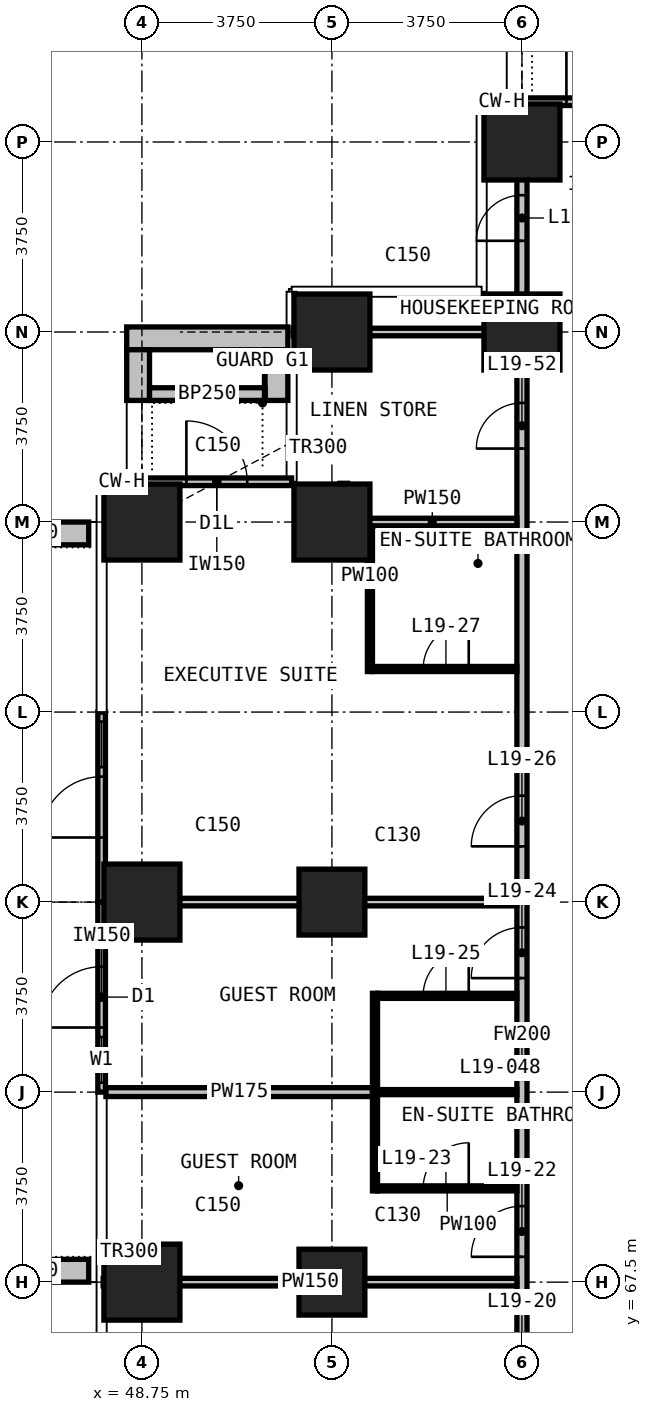
"""IFC4 building model, lengths in metres.
Left out: names, types, materials, properties, quantities, classifications, styles, units other than length and angle.
Written with IfcOpenShell. Run it as: python <this file> out.ifc"""

import sys

from ifc_helpers import new_model, si_unit, direction, frame, frame_2d, origin, origin_2d, place, context, subcontext, project, spatial, rectangle, extrude, element, fill, save


model = new_model("IFC4")
c1 = context("Model", 3, precision=1e-05, world=origin(), true_north=direction((0.0, 1.0)))
c2 = subcontext(c1, "Body", "Model", "MODEL_VIEW")
j1 = project(units=[si_unit("LENGTHUNIT", "METRE"), si_unit("PLANEANGLEUNIT", "RADIAN")], contexts=[c1])
p1 = place(None, origin())
s1 = spatial("IfcSite", under=j1, at=p1, CompositionType="ELEMENT")
p2 = place(p1, origin())
s2 = spatial("IfcBuilding", under=s1, at=p2, CompositionType="ELEMENT")
p3 = place(p2, frame((0.0, 0.0, 82.4)))
s3 = spatial("IfcBuildingStorey", under=s2, at=p3, CompositionType="ELEMENT", Elevation=82.4)
for number, where, z_axis, x_axis in (
    (1, (48.75, 67.5, 0.0), (0.0, 0.0, 1.0), (1.0, 0.0, 0.0)),
    (2, (48.75, 75.0, 0.0), (0.0, 0.0, 1.0), (1.0, 0.0, 0.0)),
    (3, (48.75, 82.5, 0.0), (0.0, 0.0, 1.0), (1.0, 0.0, 0.0)),
):
    element("IfcColumn", number, at=place(p3, frame(where, z_axis=z_axis, x_axis=x_axis)), inside=s3, PredefinedType="COLUMN", context=c2, shape_type="SweptSolid", body=[
        extrude(rectangle(XDim=1.5, YDim=1.5, at=origin_2d()), origin(), (0.0, 0.0, 1.0), 3.3),
    ])
for number, where, z_axis, x_axis in (
    (4, (52.5, 67.5, 0.0), (0.0, 0.0, 1.0), (1.0, 0.0, 0.0)),
    (5, (52.5, 75.0, 0.0), (0.0, 0.0, 1.0), (1.0, 0.0, 0.0)),
):
    element("IfcColumn", number, at=place(p3, frame(where, z_axis=z_axis, x_axis=x_axis)), inside=s3, PredefinedType="COLUMN", context=c2, shape_type="SweptSolid", body=[
        extrude(rectangle(XDim=1.3, YDim=1.3, at=origin_2d()), origin(), (0.0, 0.0, 1.0), 3.3),
    ])
for number, where, z_axis, x_axis in (
    (6, (52.5, 82.5, 0.0), (0.0, 0.0, 1.0), (1.0, 0.0, 0.0)),
    (7, (52.5, 86.25, 0.0), (0.0, 0.0, 1.0), (1.0, 0.0, 0.0)),
    (8, (56.25, 86.25, 0.0), (0.0, 0.0, 1.0), (1.0, 0.0, 0.0)),
    (9, (56.25, 90.0, 0.0), (0.0, 0.0, 1.0), (1.0, 0.0, 0.0)),
):
    element("IfcColumn", number, at=place(p3, frame(where, z_axis=z_axis, x_axis=x_axis)), inside=s3, PredefinedType="COLUMN", context=c2, shape_type="SweptSolid", body=[
        extrude(rectangle(XDim=1.5, YDim=1.5, at=origin_2d()), origin(), (0.0, 0.0, 1.0), 3.3),
    ])
p4 = place(p3, frame((56.25, 90.795, 0.0), z_axis=(0.0, 0.0, 1.0), x_axis=(1.0, 0.0, 0.0)))
e10 = element("IfcWall", 10, at=p4, inside=s3, PredefinedType="SOLIDWALL", context=c2, shape_type="SweptSolid", body=[
    extrude(rectangle(XDim=2.955, YDim=0.15, at=frame_2d((1.478, 0.0))), origin(), (0.0, 0.0, 1.0), 3.0),
])
p5 = place(p4, frame((0.877, 0.0, 0.0)))
e11 = element("IfcOpeningElement", 11, at=p5, cuts=e10, PredefinedType="OPENING", context=c2, shape_type="SweptSolid", body=[
    extrude(rectangle(XDim=1.2, YDim=2.4, at=frame_2d((0.6, 1.2))), frame((0.0, 0.085, 0.0), z_axis=(0.0, -1.0, 0.0), x_axis=(1.0, 0.0, 0.0)), (0.0, 0.0, 1.0), 0.17),
])
p6 = place(p3, frame((48.75, 83.295, 0.0), z_axis=(0.0, 0.0, 1.0), x_axis=(1.0, 0.0, 0.0)))
e12 = element("IfcWall", 12, at=p6, inside=s3, PredefinedType="SOLIDWALL", context=c2, shape_type="SweptSolid", body=[
    extrude(rectangle(XDim=2.955, YDim=0.15, at=frame_2d((1.478, 0.0))), origin(), (0.0, 0.0, 1.0), 3.0),
])
p7 = place(p6, frame((0.877, 0.0, 0.0)))
e13 = element("IfcOpeningElement", 13, at=p7, cuts=e12, PredefinedType="OPENING", context=c2, shape_type="SweptSolid", body=[
    extrude(rectangle(XDim=1.2, YDim=2.0, at=frame_2d((0.6, 1.0))), frame((0.0, 0.085, 0.0), z_axis=(0.0, -1.0, 0.0), x_axis=(1.0, 0.0, 0.0)), (0.0, 0.0, 1.0), 0.17),
])
p8 = place(p3, frame((47.955, 71.25, 0.0), z_axis=(0.0, 0.0, 1.0), x_axis=(0.0, 1.0, 0.0)))
e14 = element("IfcWall", 14, at=p8, inside=s3, PredefinedType="SOLIDWALL", context=c2, shape_type="SweptSolid", body=[
    extrude(rectangle(XDim=3.75, YDim=0.15, at=frame_2d((1.875, 0.0))), origin(), (0.0, 0.0, 1.0), 3.0),
])
p9 = place(p8, frame((0.188, 0.0, 0.1)))
e15 = element("IfcOpeningElement", 15, at=p9, cuts=e14, PredefinedType="OPENING", context=c2, shape_type="SweptSolid", body=[
    extrude(rectangle(XDim=0.9, YDim=2.4, at=frame_2d((0.45, 1.2))), frame((0.0, 0.085, 0.0), z_axis=(0.0, -1.0, 0.0), x_axis=(1.0, 0.0, 0.0)), (0.0, 0.0, 1.0), 0.17),
])
p10 = place(p8, frame((1.275, 0.0, 0.0)))
e16 = element("IfcOpeningElement", 16, at=p10, cuts=e14, PredefinedType="OPENING", context=c2, shape_type="SweptSolid", body=[
    extrude(rectangle(XDim=1.2, YDim=2.4, at=frame_2d((0.6, 1.2))), frame((0.0, 0.085, 0.0), z_axis=(0.0, -1.0, 0.0), x_axis=(1.0, 0.0, 0.0)), (0.0, 0.0, 1.0), 0.17),
])
p11 = place(p3, frame((47.955, 75.0, 0.0), z_axis=(0.0, 0.0, 1.0), x_axis=(0.0, 1.0, 0.0)))
e17 = element("IfcWall", 17, at=p11, inside=s3, PredefinedType="SOLIDWALL", context=c2, shape_type="SweptSolid", body=[
    extrude(rectangle(XDim=3.75, YDim=0.15, at=frame_2d((1.875, 0.0))), origin(), (0.0, 0.0, 1.0), 3.0),
])
p12 = place(p11, frame((1.275, 0.0, 0.0)))
e18 = element("IfcOpeningElement", 18, at=p12, cuts=e17, PredefinedType="OPENING", context=c2, shape_type="SweptSolid", body=[
    extrude(rectangle(XDim=1.2, YDim=2.4, at=frame_2d((0.6, 1.2))), frame((0.0, 0.085, 0.0), z_axis=(0.0, -1.0, 0.0), x_axis=(1.0, 0.0, 0.0)), (0.0, 0.0, 1.0), 0.17),
])
p13 = place(p11, frame((2.663, 0.0, 0.1)))
e19 = element("IfcOpeningElement", 19, at=p13, cuts=e17, PredefinedType="OPENING", context=c2, shape_type="SweptSolid", body=[
    extrude(rectangle(XDim=0.9, YDim=2.4, at=frame_2d((0.45, 1.2))), frame((0.0, 0.085, 0.0), z_axis=(0.0, -1.0, 0.0), x_axis=(1.0, 0.0, 0.0)), (0.0, 0.0, 1.0), 0.17),
])
p14 = place(p3, frame((48.45, 86.125, 0.0), z_axis=(0.0, 0.0, 1.0), x_axis=(1.0, 0.0, 0.0)))
e20 = element("IfcWall", 20, at=p14, inside=s3, PredefinedType="USERDEFINED", context=c2, shape_type="SweptSolid", body=[
    extrude(rectangle(XDim=3.18, YDim=0.45, at=frame_2d((1.59, 0.0))), origin(), (0.0, 0.0, 1.0), 1.1),
])
for number, where, z_axis, x_axis in (
    (21, (48.675, 84.9, 0.0), (0.0, 0.0, 1.0), (0.0, 1.0, 0.0)),
    (22, (51.405, 84.9, 0.0), (0.0, 0.0, 1.0), (0.0, 1.0, 0.0)),
):
    element("IfcWall", number, at=place(p3, frame(where, z_axis=z_axis, x_axis=x_axis)), inside=s3, PredefinedType="USERDEFINED", context=c2, shape_type="SweptSolid", body=[
        extrude(rectangle(XDim=1.0, YDim=0.45, at=frame_2d((0.5, 0.0))), origin(), (0.0, 0.0, 1.0), 1.1),
    ])
p15 = place(p3, frame((48.9, 85.025, 0.0), z_axis=(0.0, 0.0, 1.0), x_axis=(1.0, 0.0, 0.0)))
e23 = element("IfcWall", 23, at=p15, inside=s3, PredefinedType="USERDEFINED", context=c2, shape_type="SweptSolid", body=[
    extrude(rectangle(XDim=2.28, YDim=0.25, at=frame_2d((1.14, 0.0))), origin(), (0.0, 0.0, 1.0), 1.0),
])
for number, where, z_axis, x_axis in (
    (24, (47.7, 67.725, 0.0), (0.0, 0.0, 1.0), (-1.0, 0.0, 0.0)),
    (25, (47.7, 82.275, 0.0), (0.0, 0.0, 1.0), (-1.0, 0.0, 0.0)),
):
    element("IfcWall", number, at=place(p3, frame(where, z_axis=z_axis, x_axis=x_axis)), inside=s3, PredefinedType="USERDEFINED", context=c2, shape_type="SweptSolid", body=[
        extrude(rectangle(XDim=2.35, YDim=0.45, at=frame_2d((1.175, 0.0))), origin(), (0.0, 0.0, 1.0), 1.1),
    ])
p16 = place(p3, frame((56.25, 52.4, 0.0), z_axis=(0.0, 0.0, 1.0), x_axis=(0.0, 1.0, 0.0)))
e26 = element("IfcWall", 26, at=p16, inside=s3, PredefinedType="PARTITIONING", context=c2, shape_type="SweptSolid", body=[
    extrude(rectangle(XDim=38.31, YDim=0.2, at=frame_2d((19.155, 0.0))), origin(), (0.0, 0.0, 1.0), 3.0),
])
p17 = place(p16, frame((2.35, 0.0, 0.0)))
e27 = element("IfcOpeningElement", 27, at=p17, cuts=e26, PredefinedType="OPENING", context=c2, shape_type="SweptSolid", body=[
    extrude(rectangle(XDim=1.0, YDim=2.2, at=frame_2d((0.5, 1.1))), frame((0.0, 0.11, 0.0), z_axis=(0.0, -1.0, 0.0), x_axis=(1.0, 0.0, 0.0)), (0.0, 0.0, 1.0), 0.22),
])
p18 = place(p16, frame((4.35, 0.0, 0.0)))
e28 = element("IfcOpeningElement", 28, at=p18, cuts=e26, PredefinedType="OPENING", context=c2, shape_type="SweptSolid", body=[
    extrude(rectangle(XDim=1.0, YDim=2.2, at=frame_2d((0.5, 1.1))), frame((0.0, 0.11, 0.0), z_axis=(0.0, -1.0, 0.0), x_axis=(1.0, 0.0, 0.0)), (0.0, 0.0, 1.0), 0.22),
])
p19 = place(p16, frame((13.0, 0.0, 0.0)))
e29 = element("IfcOpeningElement", 29, at=p19, cuts=e26, PredefinedType="OPENING", context=c2, shape_type="SweptSolid", body=[
    extrude(rectangle(XDim=1.0, YDim=2.2, at=frame_2d((0.5, 1.1))), frame((0.0, 0.11, 0.0), z_axis=(0.0, -1.0, 0.0), x_axis=(1.0, 0.0, 0.0)), (0.0, 0.0, 1.0), 0.22),
])
p20 = place(p16, frame((15.6, 0.0, 0.0)))
e30 = element("IfcOpeningElement", 30, at=p20, cuts=e26, PredefinedType="OPENING", context=c2, shape_type="SweptSolid", body=[
    extrude(rectangle(XDim=1.0, YDim=2.2, at=frame_2d((0.5, 1.1))), frame((0.0, 0.11, 0.0), z_axis=(0.0, -1.0, 0.0), x_axis=(1.0, 0.0, 0.0)), (0.0, 0.0, 1.0), 0.22),
])
p21 = place(p16, frame((21.1, 0.0, 0.0)))
e31 = element("IfcOpeningElement", 31, at=p21, cuts=e26, PredefinedType="OPENING", context=c2, shape_type="SweptSolid", body=[
    extrude(rectangle(XDim=1.0, YDim=2.2, at=frame_2d((0.5, 1.1))), frame((0.0, 0.11, 0.0), z_axis=(0.0, -1.0, 0.0), x_axis=(1.0, 0.0, 0.0)), (0.0, 0.0, 1.0), 0.22),
])
p22 = place(p16, frame((23.7, 0.0, 0.0)))
e32 = element("IfcOpeningElement", 32, at=p22, cuts=e26, PredefinedType="OPENING", context=c2, shape_type="SweptSolid", body=[
    extrude(rectangle(XDim=1.0, YDim=2.2, at=frame_2d((0.5, 1.1))), frame((0.0, 0.11, 0.0), z_axis=(0.0, -1.0, 0.0), x_axis=(1.0, 0.0, 0.0)), (0.0, 0.0, 1.0), 0.22),
])
p23 = place(p16, frame((31.55, 0.0, 0.0)))
e33 = element("IfcOpeningElement", 33, at=p23, cuts=e26, PredefinedType="OPENING", context=c2, shape_type="SweptSolid", body=[
    extrude(rectangle(XDim=0.9, YDim=2.2, at=frame_2d((0.45, 1.1))), frame((0.0, 0.11, 0.0), z_axis=(0.0, -1.0, 0.0), x_axis=(1.0, 0.0, 0.0)), (0.0, 0.0, 1.0), 0.22),
])
p24 = place(p16, frame((35.65, 0.0, 0.0)))
e34 = element("IfcOpeningElement", 34, at=p24, cuts=e26, PredefinedType="OPENING", context=c2, shape_type="SweptSolid", body=[
    extrude(rectangle(XDim=0.9, YDim=2.2, at=frame_2d((0.45, 1.1))), frame((0.0, 0.11, 0.0), z_axis=(0.0, -1.0, 0.0), x_axis=(1.0, 0.0, 0.0)), (0.0, 0.0, 1.0), 0.22),
])
p25 = place(p3, frame((48.04, 71.25, 0.0), z_axis=(0.0, 0.0, 1.0), x_axis=(1.0, 0.0, 0.0)))
e35 = element("IfcWall", 35, at=p25, inside=s3, PredefinedType="PARTITIONING", context=c2, shape_type="SweptSolid", body=[
    extrude(rectangle(XDim=5.26, YDim=0.175, at=frame_2d((2.63, 0.0))), origin(), (0.0, 0.0, 1.0), 3.0),
])
p26 = place(p3, frame((47.985, 67.5, 0.0), z_axis=(0.0, 0.0, 1.0), x_axis=(1.0, 0.0, 0.0)))
e36 = element("IfcWall", 36, at=p26, inside=s3, PredefinedType="PARTITIONING", context=c2, shape_type="SweptSolid", body=[
    extrude(rectangle(XDim=8.165, YDim=0.15, at=frame_2d((4.083, 0.0))), origin(), (0.0, 0.0, 1.0), 3.0),
])
p27 = place(p3, frame((48.04, 75.0, 0.0), z_axis=(0.0, 0.0, 1.0), x_axis=(1.0, 0.0, 0.0)))
e37 = element("IfcWall", 37, at=p27, inside=s3, PredefinedType="PARTITIONING", context=c2, shape_type="SweptSolid", body=[
    extrude(rectangle(XDim=8.11, YDim=0.15, at=frame_2d((4.055, 0.0))), origin(), (0.0, 0.0, 1.0), 3.0),
])
p28 = place(p3, frame((52.81, 82.5, 0.0), z_axis=(0.0, 0.0, 1.0), x_axis=(1.0, 0.0, 0.0)))
e38 = element("IfcWall", 38, at=p28, inside=s3, PredefinedType="PARTITIONING", context=c2, shape_type="SweptSolid", body=[
    extrude(rectangle(XDim=3.34, YDim=0.15, at=frame_2d((1.67, 0.0))), origin(), (0.0, 0.0, 1.0), 3.0),
])
p29 = place(p3, frame((51.735, 86.25, 0.0), z_axis=(0.0, 0.0, 1.0), x_axis=(1.0, 0.0, 0.0)))
e39 = element("IfcWall", 39, at=p29, inside=s3, PredefinedType="PARTITIONING", context=c2, shape_type="SweptSolid", body=[
    extrude(rectangle(XDim=4.415, YDim=0.15, at=frame_2d((2.208, 0.0))), origin(), (0.0, 0.0, 1.0), 3.0),
])
p30 = place(p3, frame((52.735, 82.425, 0.0), z_axis=(0.0, 0.0, 1.0), x_axis=(0.0, 1.0, 0.0)))
e40 = element("IfcWall", 40, at=p30, inside=s3, PredefinedType="PARTITIONING", context=c2, shape_type="SweptSolid", body=[
    extrude(rectangle(XDim=0.84, YDim=0.15, at=frame_2d((0.42, 0.0))), origin(), (0.0, 0.0, 1.0), 3.0),
])
p31 = place(p3, frame((53.4, 69.35, 0.0), z_axis=(0.0, 0.0, 1.0), x_axis=(1.0, 0.0, 0.0)))
e41 = element("IfcWall", 41, at=p31, inside=s3, PredefinedType="PARTITIONING", context=c2, shape_type="SweptSolid", body=[
    extrude(rectangle(XDim=2.75, YDim=0.1, at=frame_2d((1.375, 0.0))), origin(), (0.0, 0.0, 1.0), 3.0),
])
p32 = place(p31, frame((0.9, 0.0, 0.0)))
e42 = element("IfcOpeningElement", 42, at=p32, cuts=e41, PredefinedType="OPENING", context=c2, shape_type="SweptSolid", body=[
    extrude(rectangle(XDim=0.9, YDim=2.2, at=frame_2d((0.45, 1.1))), frame((0.0, 0.06, 0.0), z_axis=(0.0, -1.0, 0.0), x_axis=(1.0, 0.0, 0.0)), (0.0, 0.0, 1.0), 0.12),
])
p33 = place(p3, frame((53.4, 71.25, 0.0), z_axis=(0.0, 0.0, 1.0), x_axis=(1.0, 0.0, 0.0)))
e43 = element("IfcWall", 43, at=p33, inside=s3, PredefinedType="PARTITIONING", context=c2, shape_type="SweptSolid", body=[
    extrude(rectangle(XDim=2.75, YDim=0.1, at=frame_2d((1.375, 0.0))), origin(), (0.0, 0.0, 1.0), 3.0),
])
p34 = place(p3, frame((53.4, 73.15, 0.0), z_axis=(0.0, 0.0, 1.0), x_axis=(1.0, 0.0, 0.0)))
e44 = element("IfcWall", 44, at=p34, inside=s3, PredefinedType="PARTITIONING", context=c2, shape_type="SweptSolid", body=[
    extrude(rectangle(XDim=2.75, YDim=0.1, at=frame_2d((1.375, 0.0))), origin(), (0.0, 0.0, 1.0), 3.0),
])
p35 = place(p34, frame((0.9, 0.0, 0.0)))
e45 = element("IfcOpeningElement", 45, at=p35, cuts=e44, PredefinedType="OPENING", context=c2, shape_type="SweptSolid", body=[
    extrude(rectangle(XDim=0.9, YDim=2.2, at=frame_2d((0.45, 1.1))), frame((0.0, 0.06, 0.0), z_axis=(0.0, -1.0, 0.0), x_axis=(1.0, 0.0, 0.0)), (0.0, 0.0, 1.0), 0.12),
])
p36 = place(p3, frame((53.3, 79.6, 0.0), z_axis=(0.0, 0.0, 1.0), x_axis=(1.0, 0.0, 0.0)))
e46 = element("IfcWall", 46, at=p36, inside=s3, PredefinedType="PARTITIONING", context=c2, shape_type="SweptSolid", body=[
    extrude(rectangle(XDim=2.85, YDim=0.1, at=frame_2d((1.425, 0.0))), origin(), (0.0, 0.0, 1.0), 3.0),
])
p37 = place(p36, frame((1.0, 0.0, 0.0)))
e47 = element("IfcOpeningElement", 47, at=p37, cuts=e46, PredefinedType="OPENING", context=c2, shape_type="SweptSolid", body=[
    extrude(rectangle(XDim=0.9, YDim=2.2, at=frame_2d((0.45, 1.1))), frame((0.0, 0.06, 0.0), z_axis=(0.0, -1.0, 0.0), x_axis=(1.0, 0.0, 0.0)), (0.0, 0.0, 1.0), 0.12),
])
p38 = place(p3, frame((53.25, 79.55, 0.0), z_axis=(0.0, 0.0, 1.0), x_axis=(0.0, 1.0, 0.0)))
e48 = element("IfcWall", 48, at=p38, inside=s3, PredefinedType="PARTITIONING", context=c2, shape_type="SweptSolid", body=[
    extrude(rectangle(XDim=2.875, YDim=0.1, at=frame_2d((1.438, 0.0))), origin(), (0.0, 0.0, 1.0), 3.0),
])
p39 = place(p3, frame((53.35, 69.3, 0.0), z_axis=(0.0, 0.0, 1.0), x_axis=(0.0, 1.0, 0.0)))
e49 = element("IfcWall", 49, at=p39, inside=s3, PredefinedType="PARTITIONING", context=c2, shape_type="SweptSolid", body=[
    extrude(rectangle(XDim=3.9, YDim=0.1, at=frame_2d((1.95, 0.0))), origin(), (0.0, 0.0, 1.0), 3.0),
])
p40 = place(p5, origin())
e50 = element("IfcDoor", 50, at=p40, inside=s3, OperationType="SINGLE_SWING_LEFT", PredefinedType="DOOR", context=c2, shape_type="SweptSolid", body=[
    extrude(rectangle(XDim=1.2, YDim=2.4, at=frame_2d((0.6, 1.2))), frame((0.0, 0.025, 0.0), z_axis=(0.0, -1.0, 0.0), x_axis=(1.0, 0.0, 0.0)), (0.0, 0.0, 1.0), 0.05),
])
fill(e11, e50)
p41 = place(p7, origin())
e51 = element("IfcDoor", 51, at=p41, inside=s3, OperationType="SINGLE_SWING_LEFT", PredefinedType="DOOR", context=c2, shape_type="SweptSolid", body=[
    extrude(rectangle(XDim=1.2, YDim=2.0, at=frame_2d((0.6, 1.0))), frame((0.0, 0.025, 0.0), z_axis=(0.0, -1.0, 0.0), x_axis=(1.0, 0.0, 0.0)), (0.0, 0.0, 1.0), 0.05),
])
fill(e13, e51)
p42 = place(p9, origin())
e52 = element("IfcWindow", 52, at=p42, inside=s3, PartitioningType="SINGLE_PANEL", PredefinedType="WINDOW", context=c2, shape_type="SweptSolid", body=[
    extrude(rectangle(XDim=0.9, YDim=2.4, at=frame_2d((0.45, 1.2))), frame((0.0, 0.03, 0.0), z_axis=(0.0, -1.0, 0.0), x_axis=(1.0, 0.0, 0.0)), (0.0, 0.0, 1.0), 0.06),
])
fill(e15, e52)
p43 = place(p10, origin())
e53 = element("IfcDoor", 53, at=p43, inside=s3, OperationType="SINGLE_SWING_LEFT", PredefinedType="DOOR", context=c2, shape_type="SweptSolid", body=[
    extrude(rectangle(XDim=1.2, YDim=2.4, at=frame_2d((0.6, 1.2))), frame((0.0, 0.025, 0.0), z_axis=(0.0, -1.0, 0.0), x_axis=(1.0, 0.0, 0.0)), (0.0, 0.0, 1.0), 0.05),
])
fill(e16, e53)
p44 = place(p12, origin())
e54 = element("IfcDoor", 54, at=p44, inside=s3, OperationType="SINGLE_SWING_LEFT", PredefinedType="DOOR", context=c2, shape_type="SweptSolid", body=[
    extrude(rectangle(XDim=1.2, YDim=2.4, at=frame_2d((0.6, 1.2))), frame((0.0, 0.025, 0.0), z_axis=(0.0, -1.0, 0.0), x_axis=(1.0, 0.0, 0.0)), (0.0, 0.0, 1.0), 0.05),
])
fill(e18, e54)
p45 = place(p13, origin())
e55 = element("IfcWindow", 55, at=p45, inside=s3, PartitioningType="SINGLE_PANEL", PredefinedType="WINDOW", context=c2, shape_type="SweptSolid", body=[
    extrude(rectangle(XDim=0.9, YDim=2.4, at=frame_2d((0.45, 1.2))), frame((0.0, 0.03, 0.0), z_axis=(0.0, -1.0, 0.0), x_axis=(1.0, 0.0, 0.0)), (0.0, 0.0, 1.0), 0.06),
])
fill(e19, e55)
p46 = place(p20, origin())
e56 = element("IfcDoor", 56, at=p46, inside=s3, OperationType="SINGLE_SWING_RIGHT", PredefinedType="DOOR", context=c2, shape_type="SweptSolid", body=[
    extrude(rectangle(XDim=1.0, YDim=2.2, at=frame_2d((0.5, 1.1))), frame((0.0, 0.025, 0.0), z_axis=(0.0, -1.0, 0.0), x_axis=(1.0, 0.0, 0.0)), (0.0, 0.0, 1.0), 0.05),
])
fill(e30, e56)
p47 = place(p32, origin())
e57 = element("IfcDoor", 57, at=p47, inside=s3, OperationType="SINGLE_SWING_RIGHT", PredefinedType="DOOR", context=c2, shape_type="SweptSolid", body=[
    extrude(rectangle(XDim=0.9, YDim=2.2, at=frame_2d((0.45, 1.1))), frame((0.0, 0.025, 0.0), z_axis=(0.0, -1.0, 0.0), x_axis=(1.0, 0.0, 0.0)), (0.0, 0.0, 1.0), 0.05),
])
fill(e42, e57)
p48 = place(p21, origin())
e58 = element("IfcDoor", 58, at=p48, inside=s3, OperationType="SINGLE_SWING_LEFT", PredefinedType="DOOR", context=c2, shape_type="SweptSolid", body=[
    extrude(rectangle(XDim=1.0, YDim=2.2, at=frame_2d((0.5, 1.1))), frame((0.0, 0.025, 0.0), z_axis=(0.0, -1.0, 0.0), x_axis=(1.0, 0.0, 0.0)), (0.0, 0.0, 1.0), 0.05),
])
fill(e31, e58)
p49 = place(p35, origin())
e59 = element("IfcDoor", 59, at=p49, inside=s3, OperationType="SINGLE_SWING_RIGHT", PredefinedType="DOOR", context=c2, shape_type="SweptSolid", body=[
    extrude(rectangle(XDim=0.9, YDim=2.2, at=frame_2d((0.45, 1.1))), frame((0.0, 0.025, 0.0), z_axis=(0.0, -1.0, 0.0), x_axis=(1.0, 0.0, 0.0)), (0.0, 0.0, 1.0), 0.05),
])
fill(e45, e59)
p50 = place(p22, origin())
e60 = element("IfcDoor", 60, at=p50, inside=s3, OperationType="SINGLE_SWING_LEFT", PredefinedType="DOOR", context=c2, shape_type="SweptSolid", body=[
    extrude(rectangle(XDim=1.0, YDim=2.2, at=frame_2d((0.5, 1.1))), frame((0.0, 0.025, 0.0), z_axis=(0.0, -1.0, 0.0), x_axis=(1.0, 0.0, 0.0)), (0.0, 0.0, 1.0), 0.05),
])
fill(e32, e60)
p51 = place(p37, origin())
e61 = element("IfcDoor", 61, at=p51, inside=s3, OperationType="SINGLE_SWING_RIGHT", PredefinedType="DOOR", context=c2, shape_type="SweptSolid", body=[
    extrude(rectangle(XDim=0.9, YDim=2.2, at=frame_2d((0.45, 1.1))), frame((0.0, 0.025, 0.0), z_axis=(0.0, -1.0, 0.0), x_axis=(1.0, 0.0, 0.0)), (0.0, 0.0, 1.0), 0.05),
])
fill(e47, e61)
p52 = place(p23, origin())
e62 = element("IfcDoor", 62, at=p52, inside=s3, OperationType="SINGLE_SWING_RIGHT", PredefinedType="DOOR", context=c2, shape_type="SweptSolid", body=[
    extrude(rectangle(XDim=0.9, YDim=2.2, at=frame_2d((0.45, 1.1))), frame((0.0, 0.025, 0.0), z_axis=(0.0, -1.0, 0.0), x_axis=(1.0, 0.0, 0.0)), (0.0, 0.0, 1.0), 0.05),
])
fill(e33, e62)
p53 = place(p24, origin())
e63 = element("IfcDoor", 63, at=p53, inside=s3, OperationType="SINGLE_SWING_LEFT", PredefinedType="DOOR", context=c2, shape_type="SweptSolid", body=[
    extrude(rectangle(XDim=0.9, YDim=2.2, at=frame_2d((0.45, 1.1))), frame((0.0, 0.025, 0.0), z_axis=(0.0, -1.0, 0.0), x_axis=(1.0, 0.0, 0.0)), (0.0, 0.0, 1.0), 0.05),
])
fill(e34, e63)
save(model, sys.argv[1])
